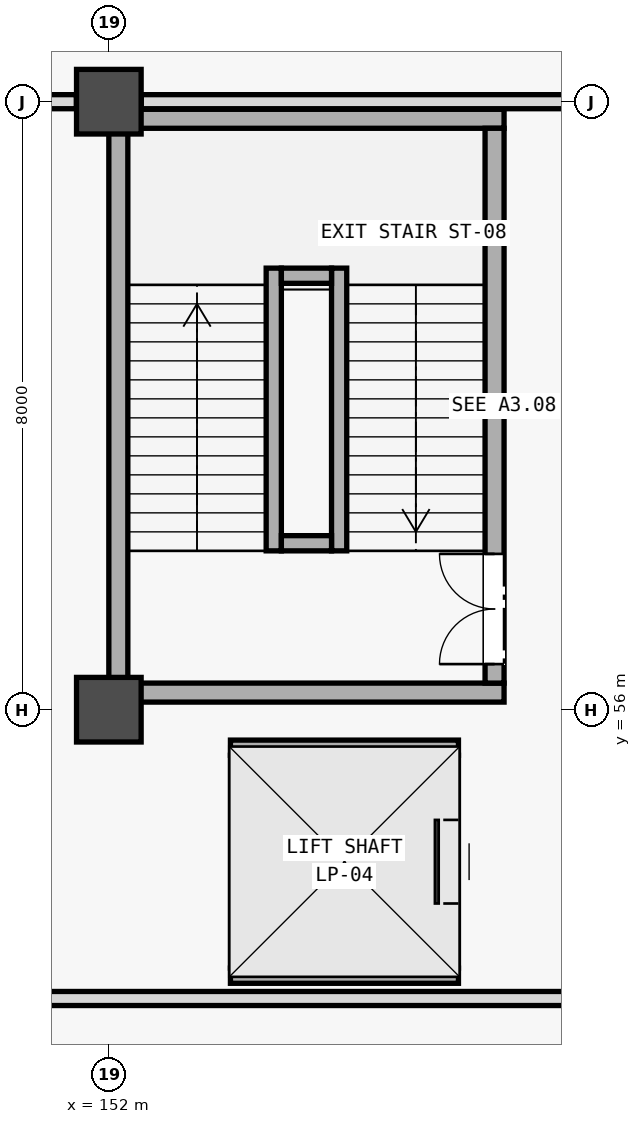
"""IFC4 building model, lengths in metres.
Left out: names, types, materials, properties, quantities, classifications, styles, units other than length and angle.
Written with IfcOpenShell. Run it as: python <this file> out.ifc"""

import sys

from ifc_helpers import new_model, si_unit, direction, frame, frame_2d, origin, origin_2d, place, context, subcontext, project, spatial, rectangle, extrude, element, fill, save


model = new_model("IFC4")
c1 = context("Model", 3, precision=1e-05, world=origin(), true_north=direction((0.0, 1.0)))
c2 = subcontext(c1, "Body", "Model", "MODEL_VIEW")
j1 = project(units=[si_unit("LENGTHUNIT", "METRE"), si_unit("PLANEANGLEUNIT", "RADIAN")], contexts=[c1])
p1 = place(None, origin())
s1 = spatial("IfcSite", under=j1, at=p1, CompositionType="ELEMENT")
p2 = place(p1, origin())
s2 = spatial("IfcBuilding", under=s1, at=p2, CompositionType="ELEMENT")
p3 = place(p2, frame((0.0, 0.0, -4.8)))
s3 = spatial("IfcBuildingStorey", under=s2, at=p3, CompositionType="ELEMENT", Elevation=-4.8)
for number, where, z_axis, x_axis in (
    (1, (152.0, 56.0, 0.0), (0.0, 0.0, 1.0), (1.0, 0.0, 0.0)),
    (2, (152.0, 64.0, 0.0), (0.0, 0.0, 1.0), (1.0, 0.0, 0.0)),
):
    element("IfcColumn", number, at=place(p3, frame(where, z_axis=z_axis, x_axis=x_axis)), inside=s3, PredefinedType="COLUMN", context=c2, shape_type="SweptSolid", body=[
        extrude(rectangle(XDim=0.85, YDim=0.85, at=origin_2d()), origin(), (0.0, 0.0, 1.0), 4.5),
    ])
for number, where, z_axis, x_axis in (
    (3, (152.0, 56.225, 0.0), (0.0, 0.0, 1.0), (1.0, 0.0, 0.0)),
    (4, (152.0, 63.775, 0.0), (0.0, 0.0, 1.0), (1.0, 0.0, 0.0)),
):
    element("IfcWall", number, at=place(p3, frame(where, z_axis=z_axis, x_axis=x_axis)), inside=s3, PredefinedType="SHEAR", context=c2, shape_type="SweptSolid", body=[
        extrude(rectangle(XDim=5.2, YDim=0.25, at=frame_2d((2.6, 0.0))), origin(), (0.0, 0.0, 1.0), 4.8),
    ])
p4 = place(p3, frame((152.125, 56.35, 0.0), z_axis=(0.0, 0.0, 1.0), x_axis=(0.0, 1.0, 0.0)))
e5 = element("IfcWall", 5, at=p4, inside=s3, PredefinedType="SHEAR", context=c2, shape_type="SweptSolid", body=[
    extrude(rectangle(XDim=7.3, YDim=0.25, at=frame_2d((3.65, 0.0))), origin(), (0.0, 0.0, 1.0), 4.8),
])
p5 = place(p3, frame((157.075, 56.35, 0.0), z_axis=(0.0, 0.0, 1.0), x_axis=(0.0, 1.0, 0.0)))
e6 = element("IfcWall", 6, at=p5, inside=s3, PredefinedType="SHEAR", context=c2, shape_type="SweptSolid", body=[
    extrude(rectangle(XDim=7.3, YDim=0.25, at=frame_2d((3.65, 0.0))), origin(), (0.0, 0.0, 1.0), 4.8),
])
p6 = place(p5, frame((0.25, 0.0, 0.0)))
e7 = element("IfcOpeningElement", 7, at=p6, cuts=e6, PredefinedType="OPENING", context=c2, shape_type="SweptSolid", body=[
    extrude(rectangle(XDim=1.45, YDim=2.2, at=frame_2d((0.725, 1.1))), frame((0.0, 0.135, 0.0), z_axis=(0.0, -1.0, 0.0), x_axis=(1.0, 0.0, 0.0)), (0.0, 0.0, 1.0), 0.27),
])
for number, where, z_axis, x_axis in (
    (8, (154.17, 58.09, 0.0), (0.0, 0.0, 1.0), (0.0, 1.0, 0.0)),
    (9, (155.03, 58.09, 0.0), (0.0, 0.0, 1.0), (0.0, 1.0, 0.0)),
):
    element("IfcWall", number, at=place(p3, frame(where, z_axis=z_axis, x_axis=x_axis)), inside=s3, PredefinedType="SHEAR", context=c2, shape_type="SweptSolid", body=[
        extrude(rectangle(XDim=3.72, YDim=0.2, at=frame_2d((1.86, 0.0))), origin(), (0.0, 0.0, 1.0), 4.8),
    ])
for number, where, z_axis, x_axis in (
    (10, (154.27, 58.19, 0.0), (0.0, 0.0, 1.0), (1.0, 0.0, 0.0)),
    (11, (154.27, 61.71, 0.0), (0.0, 0.0, 1.0), (1.0, 0.0, 0.0)),
):
    element("IfcWall", number, at=place(p3, frame(where, z_axis=z_axis, x_axis=x_axis)), inside=s3, PredefinedType="SHEAR", context=c2, shape_type="SweptSolid", body=[
        extrude(rectangle(XDim=0.66, YDim=0.2, at=frame_2d((0.33, 0.0))), origin(), (0.0, 0.0, 1.0), 4.8),
    ])
for number, where, z_axis, x_axis in (
    (12, (153.6, 52.5, 0.0), (0.0, 0.0, 1.0), (1.0, 0.0, 0.0)),
    (13, (153.6, 55.5, 0.0), (0.0, 0.0, 1.0), (1.0, 0.0, 0.0)),
):
    element("IfcWall", number, at=place(p3, frame(where, z_axis=z_axis, x_axis=x_axis)), inside=s3, PredefinedType="SHEAR", context=c2, shape_type="SweptSolid", body=[
        extrude(rectangle(XDim=3.0, YDim=0.2, at=frame_2d((1.5, 0.0))), origin(), (0.0, 0.0, 1.0), 4.8),
    ])
p7 = place(p3, frame((153.7, 52.6, 0.0), z_axis=(0.0, 0.0, 1.0), x_axis=(0.0, 1.0, 0.0)))
e14 = element("IfcWall", 14, at=p7, inside=s3, PredefinedType="SHEAR", context=c2, shape_type="SweptSolid", body=[
    extrude(rectangle(XDim=2.8, YDim=0.2, at=frame_2d((1.4, 0.0))), origin(), (0.0, 0.0, 1.0), 4.8),
])
p8 = place(p3, frame((156.5, 52.6, 0.0), z_axis=(0.0, 0.0, 1.0), x_axis=(0.0, 1.0, 0.0)))
e15 = element("IfcWall", 15, at=p8, inside=s3, PredefinedType="SHEAR", context=c2, shape_type="SweptSolid", body=[
    extrude(rectangle(XDim=2.8, YDim=0.2, at=frame_2d((1.4, 0.0))), origin(), (0.0, 0.0, 1.0), 4.8),
])
p9 = place(p8, frame((0.85, 0.0, 0.0)))
e16 = element("IfcOpeningElement", 16, at=p9, cuts=e15, PredefinedType="OPENING", context=c2, shape_type="SweptSolid", body=[
    extrude(rectangle(XDim=1.1, YDim=2.2, at=frame_2d((0.55, 1.1))), frame((0.0, 0.11, 0.0), z_axis=(0.0, -1.0, 0.0), x_axis=(1.0, 0.0, 0.0)), (0.0, 0.0, 1.0), 0.22),
])
p10 = place(p3, frame((144.15, 52.2, 0.0), z_axis=(0.0, 0.0, 1.0), x_axis=(1.0, 0.0, 0.0)))
e17 = element("IfcWall", 17, at=p10, inside=s3, PredefinedType="STANDARD", context=c2, shape_type="SweptSolid", body=[
    extrude(rectangle(XDim=17.85, YDim=0.185, at=frame_2d((8.925, 0.0))), origin(), (0.0, 0.0, 1.0), 3.75),
])
p11 = place(p3, frame((144.352, 64.0, 0.0), z_axis=(0.0, 0.0, 1.0), x_axis=(1.0, 0.0, 0.0)))
e18 = element("IfcWall", 18, at=p11, inside=s3, PredefinedType="STANDARD", context=c2, shape_type="SweptSolid", body=[
    extrude(rectangle(XDim=7.221, YDim=0.185, at=frame_2d((3.61, 0.0))), origin(), (0.0, 0.0, 1.0), 3.7),
])
p12 = place(p3, frame((152.427, 64.0, 0.0), z_axis=(0.0, 0.0, 1.0), x_axis=(1.0, 0.0, 0.0)))
e19 = element("IfcWall", 19, at=p12, inside=s3, PredefinedType="STANDARD", context=c2, shape_type="SweptSolid", body=[
    extrude(rectangle(XDim=9.146, YDim=0.185, at=frame_2d((4.573, 0.0))), origin(), (0.0, 0.0, 1.0), 3.35),
])
p13 = place(p6, origin())
e20 = element("IfcDoor", 20, at=p13, inside=s3, OperationType="DOUBLE_DOOR_SINGLE_SWING", PredefinedType="DOOR", context=c2, shape_type="SweptSolid", body=[
    extrude(rectangle(XDim=1.45, YDim=2.2, at=frame_2d((0.725, 1.1))), frame((0.0, 0.025, 0.0), z_axis=(0.0, -1.0, 0.0), x_axis=(1.0, 0.0, 0.0)), (0.0, 0.0, 1.0), 0.05),
])
fill(e7, e20)
p14 = place(p9, origin())
e21 = element("IfcDoor", 21, at=p14, inside=s3, OperationType="SLIDING_TO_LEFT", PredefinedType="DOOR", context=c2, shape_type="SweptSolid", body=[
    extrude(rectangle(XDim=1.1, YDim=2.2, at=frame_2d((0.55, 1.1))), frame((0.0, 0.025, 0.0), z_axis=(0.0, -1.0, 0.0), x_axis=(1.0, 0.0, 0.0)), (0.0, 0.0, 1.0), 0.05),
])
fill(e16, e21)
save(model, sys.argv[1])
